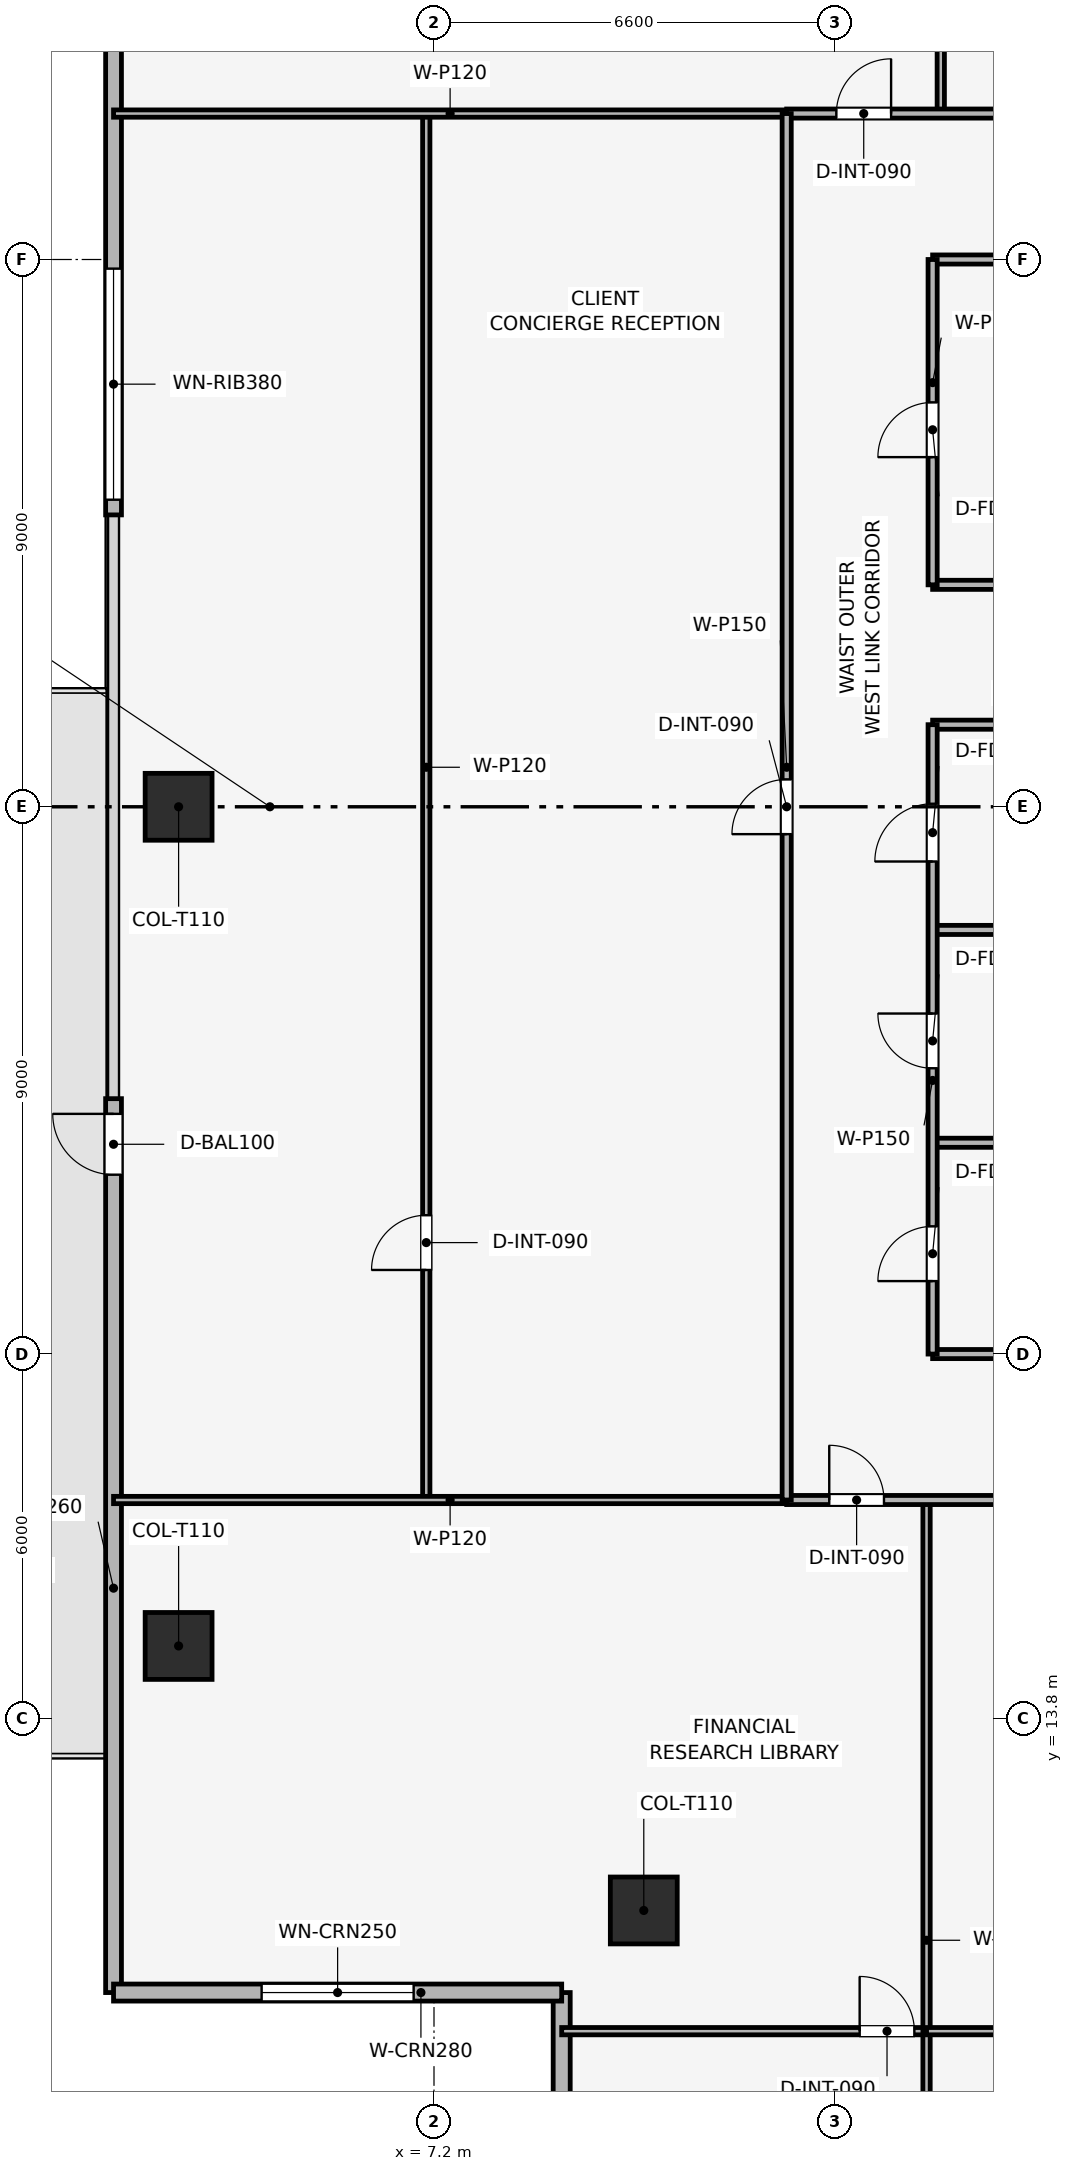
"""IFC4 building model, lengths in metres.
Left out: names, types, materials, properties, quantities, classifications, styles, units other than length and angle.
Written with IfcOpenShell. Run it as: python <this file> out.ifc"""

import sys

from ifc_helpers import new_model, si_unit, direction, frame, frame_2d, origin, origin_2d, place, context, subcontext, project, spatial, rectangle, extrude, element, fill, save


model = new_model("IFC4")
c1 = context("Model", 3, precision=1e-05, world=origin(), true_north=direction((0.0, 1.0)))
c2 = subcontext(c1, "Body", "Model", "MODEL_VIEW")
j1 = project(units=[si_unit("LENGTHUNIT", "METRE"), si_unit("PLANEANGLEUNIT", "RADIAN")], contexts=[c1])
p1 = place(None, origin())
s1 = spatial("IfcSite", under=j1, at=p1, CompositionType="ELEMENT")
p2 = place(p1, origin())
s2 = spatial("IfcBuilding", under=s1, at=p2, CompositionType="ELEMENT")
p3 = place(p2, frame((0.0, 0.0, 211.2)))
s3 = spatial("IfcBuildingStorey", under=s2, at=p3, CompositionType="ELEMENT", Elevation=211.2)
for number, where, z_axis, x_axis in (
    (1, (3.0, 28.8, 0.003), (0.0, 0.0, 1.0), (1.0, 0.0, 0.0)),
    (2, (3.0, 15.0, 0.003), (0.0, 0.0, 1.0), (1.0, 0.0, 0.0)),
    (3, (10.65, 10.65, 0.003), (0.0, 0.0, 1.0), (1.0, 0.0, 0.0)),
):
    element("IfcColumn", number, at=place(p3, frame(where, z_axis=z_axis, x_axis=x_axis)), inside=s3, PredefinedType="COLUMN", context=c2, shape_type="SweptSolid", body=[
        extrude(rectangle(XDim=1.1, YDim=1.1, at=origin_2d()), origin(), (0.0, 0.0, 1.0), 3.494),
    ])
p4 = place(p3, frame((1.93, 9.3, 0.0), z_axis=(0.0, 0.0, 1.0), x_axis=(0.0, 1.0, 0.0)))
e4 = element("IfcWall", 4, at=p4, inside=s3, PredefinedType="SOLIDWALL", context=c2, shape_type="SweptSolid", body=[
    extrude(rectangle(XDim=14.7, YDim=0.26, at=frame_2d((7.35, 0.0))), origin(), (0.0, 0.0, 1.0), 3.5),
])
p5 = place(p4, frame((13.45, 0.0, 0.0)))
e5 = element("IfcOpeningElement", 5, at=p5, cuts=e4, PredefinedType="OPENING", context=c2, shape_type="SweptSolid", body=[
    extrude(rectangle(XDim=1.0, YDim=2.2, at=frame_2d((0.5, 1.1))), frame((0.0, 0.14, 0.0), z_axis=(0.0, -1.0, 0.0), x_axis=(1.0, 0.0, 0.0)), (0.0, 0.0, 1.0), 0.28),
])
p6 = place(p3, frame((1.93, 33.6, 0.0), z_axis=(0.0, 0.0, 1.0), x_axis=(0.0, 1.0, 0.0)))
e6 = element("IfcWall", 6, at=p6, inside=s3, PredefinedType="SOLIDWALL", context=c2, shape_type="SweptSolid", body=[
    extrude(rectangle(XDim=14.7, YDim=0.26, at=frame_2d((7.35, 0.0))), origin(), (0.0, 0.0, 1.0), 3.5),
])
p7 = place(p6, frame((0.25, 0.0, 0.9)))
e7 = element("IfcOpeningElement", 7, at=p7, cuts=e6, PredefinedType="OPENING", context=c2, shape_type="SweptSolid", body=[
    extrude(rectangle(XDim=3.8, YDim=1.9, at=frame_2d((1.9, 0.95))), frame((0.0, 0.14, 0.0), z_axis=(0.0, -1.0, 0.0), x_axis=(1.0, 0.0, 0.0)), (0.0, 0.0, 1.0), 0.28),
])
p8 = place(p3, frame((9.3, 1.93, 0.0), z_axis=(0.0, 0.0, 1.0), x_axis=(0.0, 1.0, 0.0)))
e8 = element("IfcWall", 8, at=p8, inside=s3, PredefinedType="SOLIDWALL", context=c2, shape_type="SweptSolid", body=[
    extrude(rectangle(XDim=7.37, YDim=0.28, at=frame_2d((3.685, 0.0))), origin(), (0.0, 0.0, 1.0), 3.5),
])
p9 = place(p8, frame((2.435, 0.0, 0.9)))
e9 = element("IfcOpeningElement", 9, at=p9, cuts=e8, PredefinedType="OPENING", context=c2, shape_type="SweptSolid", body=[
    extrude(rectangle(XDim=2.5, YDim=1.9, at=frame_2d((1.25, 0.95))), frame((0.0, 0.15, 0.0), z_axis=(0.0, -1.0, 0.0), x_axis=(1.0, 0.0, 0.0)), (0.0, 0.0, 1.0), 0.3),
])
p10 = place(p3, frame((9.3, 9.3, 0.0), z_axis=(0.0, 0.0, 1.0), x_axis=(-1.0, 0.0, 0.0)))
e10 = element("IfcWall", 10, at=p10, inside=s3, PredefinedType="SOLIDWALL", context=c2, shape_type="SweptSolid", body=[
    extrude(rectangle(XDim=7.37, YDim=0.28, at=frame_2d((3.685, 0.0))), origin(), (0.0, 0.0, 1.0), 3.5),
])
p11 = place(p10, frame((2.435, 0.0, 0.9)))
e11 = element("IfcOpeningElement", 11, at=p11, cuts=e10, PredefinedType="OPENING", context=c2, shape_type="SweptSolid", body=[
    extrude(rectangle(XDim=2.5, YDim=1.9, at=frame_2d((1.25, 0.95))), frame((0.0, 0.15, 0.0), z_axis=(0.0, -1.0, 0.0), x_axis=(1.0, 0.0, 0.0)), (0.0, 0.0, 1.0), 0.3),
])
p12 = place(p3, frame((15.4, 19.8, 0.0), z_axis=(0.0, 0.0, 1.0), x_axis=(1.0, 0.0, 0.0)))
e12 = element("IfcWall", 12, at=p12, inside=s3, PredefinedType="PARTITIONING", context=c2, shape_type="SweptSolid", body=[
    extrude(rectangle(XDim=4.4, YDim=0.15, at=frame_2d((2.2, 0.0))), origin(), (0.0, 0.0, 1.0), 3.035),
])
for number, where, z_axis, x_axis in (
    (13, (15.4, 23.275, 0.0), (0.0, 0.0, 1.0), (1.0, 0.0, 0.0)),
    (14, (15.4, 26.775, 0.0), (0.0, 0.0, 1.0), (1.0, 0.0, 0.0)),
    (15, (15.4, 30.15, 0.0), (0.0, 0.0, 1.0), (1.0, 0.0, 0.0)),
    (16, (15.4, 32.45, 0.0), (0.0, 0.0, 1.0), (1.0, 0.0, 0.0)),
):
    element("IfcWall", number, at=place(p3, frame(where, z_axis=z_axis, x_axis=x_axis)), inside=s3, PredefinedType="PARTITIONING", context=c2, shape_type="SweptSolid", body=[
        extrude(rectangle(XDim=4.4, YDim=0.15, at=frame_2d((2.2, 0.0))), origin(), (0.0, 0.0, 1.0), 3.5),
    ])
p13 = place(p3, frame((15.4, 37.8, 0.0), z_axis=(0.0, 0.0, 1.0), x_axis=(1.0, 0.0, 0.0)))
e17 = element("IfcWall", 17, at=p13, inside=s3, PredefinedType="PARTITIONING", context=c2, shape_type="SweptSolid", body=[
    extrude(rectangle(XDim=4.4, YDim=0.15, at=frame_2d((2.2, 0.0))), origin(), (0.0, 0.0, 1.0), 3.035),
])
p14 = place(p3, frame((15.4, 19.8, 0.0), z_axis=(0.0, 0.0, 1.0), x_axis=(0.0, 1.0, 0.0)))
e18 = element("IfcWall", 18, at=p14, inside=s3, PredefinedType="PARTITIONING", context=c2, shape_type="SweptSolid", body=[
    extrude(rectangle(XDim=10.35, YDim=0.15, at=frame_2d((5.175, 0.0))), origin(), (0.0, 0.0, 1.0), 3.035),
])
p15 = place(p14, frame((1.2, 0.0, 0.0)))
e19 = element("IfcOpeningElement", 19, at=p15, cuts=e18, PredefinedType="OPENING", context=c2, shape_type="SweptSolid", body=[
    extrude(rectangle(XDim=0.9, YDim=2.1, at=frame_2d((0.45, 1.05))), frame((0.0, 0.085, 0.0), z_axis=(0.0, -1.0, 0.0), x_axis=(1.0, 0.0, 0.0)), (0.0, 0.0, 1.0), 0.17),
])
p16 = place(p14, frame((4.7, 0.0, 0.0)))
e20 = element("IfcOpeningElement", 20, at=p16, cuts=e18, PredefinedType="OPENING", context=c2, shape_type="SweptSolid", body=[
    extrude(rectangle(XDim=0.9, YDim=2.1, at=frame_2d((0.45, 1.05))), frame((0.0, 0.085, 0.0), z_axis=(0.0, -1.0, 0.0), x_axis=(1.0, 0.0, 0.0)), (0.0, 0.0, 1.0), 0.17),
])
p17 = place(p14, frame((8.1, 0.0, 0.0)))
e21 = element("IfcOpeningElement", 21, at=p17, cuts=e18, PredefinedType="OPENING", context=c2, shape_type="SweptSolid", body=[
    extrude(rectangle(XDim=0.95, YDim=2.1, at=frame_2d((0.475, 1.05))), frame((0.0, 0.085, 0.0), z_axis=(0.0, -1.0, 0.0), x_axis=(1.0, 0.0, 0.0)), (0.0, 0.0, 1.0), 0.17),
])
p18 = place(p3, frame((15.4, 32.45, 0.0), z_axis=(0.0, 0.0, 1.0), x_axis=(0.0, 1.0, 0.0)))
e22 = element("IfcWall", 22, at=p18, inside=s3, PredefinedType="PARTITIONING", context=c2, shape_type="SweptSolid", body=[
    extrude(rectangle(XDim=5.35, YDim=0.15, at=frame_2d((2.675, 0.0))), origin(), (0.0, 0.0, 1.0), 3.035),
])
p19 = place(p18, frame((2.1, 0.0, 0.0)))
e23 = element("IfcOpeningElement", 23, at=p19, cuts=e22, PredefinedType="OPENING", context=c2, shape_type="SweptSolid", body=[
    extrude(rectangle(XDim=0.9, YDim=2.1, at=frame_2d((0.45, 1.05))), frame((0.0, 0.085, 0.0), z_axis=(0.0, -1.0, 0.0), x_axis=(1.0, 0.0, 0.0)), (0.0, 0.0, 1.0), 0.17),
])
p20 = place(p3, frame((9.3, 8.665, 0.0), z_axis=(0.0, 0.0, 1.0), x_axis=(1.0, 0.0, 0.0)))
e24 = element("IfcWall", 24, at=p20, inside=s3, PredefinedType="PARTITIONING", context=c2, shape_type="SweptSolid", body=[
    extrude(rectangle(XDim=6.0, YDim=0.12, at=frame_2d((3.0, 0.0))), origin(), (0.0, 0.0, 1.0), 2.885),
])
p21 = place(p20, frame((4.9, 0.0, 0.0)))
e25 = element("IfcOpeningElement", 25, at=p21, cuts=e24, PredefinedType="OPENING", context=c2, shape_type="SweptSolid", body=[
    extrude(rectangle(XDim=0.9, YDim=2.1, at=frame_2d((0.45, 1.05))), frame((0.0, 0.07, 0.0), z_axis=(0.0, -1.0, 0.0), x_axis=(1.0, 0.0, 0.0)), (0.0, 0.0, 1.0), 0.14),
])
p22 = place(p3, frame((15.3, 1.93, 0.0), z_axis=(0.0, 0.0, 1.0), x_axis=(0.0, 1.0, 0.0)))
e26 = element("IfcWall", 26, at=p22, inside=s3, PredefinedType="PARTITIONING", context=c2, shape_type="SweptSolid", body=[
    extrude(rectangle(XDim=15.47, YDim=0.12, at=frame_2d((7.735, 0.0))), origin(), (0.0, 0.0, 1.0), 2.885),
])
p23 = place(p3, frame((15.3, 8.665, 0.0), z_axis=(0.0, 0.0, 1.0), x_axis=(1.0, 0.0, 0.0)))
e27 = element("IfcWall", 27, at=p23, inside=s3, PredefinedType="PARTITIONING", context=c2, shape_type="SweptSolid", body=[
    extrude(rectangle(XDim=13.266, YDim=0.12, at=frame_2d((6.633, 0.0))), origin(), (0.0, 0.0, 1.0), 3.035),
])
p24 = place(p23, frame((6.183, 0.0, 0.0)))
e28 = element("IfcOpeningElement", 28, at=p24, cuts=e27, PredefinedType="OPENING", context=c2, shape_type="SweptSolid", body=[
    extrude(rectangle(XDim=0.9, YDim=2.1, at=frame_2d((0.45, 1.05))), frame((0.0, 0.07, 0.0), z_axis=(0.0, -1.0, 0.0), x_axis=(1.0, 0.0, 0.0)), (0.0, 0.0, 1.0), 0.14),
])
p25 = place(p3, frame((15.534, 40.2, 0.0), z_axis=(0.0, 0.0, 1.0), x_axis=(0.0, 1.0, 0.0)))
e29 = element("IfcWall", 29, at=p25, inside=s3, PredefinedType="PARTITIONING", context=c2, shape_type="SweptSolid", body=[
    extrude(rectangle(XDim=15.47, YDim=0.12, at=frame_2d((7.735, 0.0))), origin(), (0.0, 0.0, 1.0), 2.885),
])
p26 = place(p3, frame((7.073, 17.4, 0.0), z_axis=(0.0, 0.0, 1.0), x_axis=(0.0, 1.0, 0.0)))
e30 = element("IfcWall", 30, at=p26, inside=s3, PredefinedType="PARTITIONING", context=c2, shape_type="SweptSolid", body=[
    extrude(rectangle(XDim=22.8, YDim=0.12, at=frame_2d((11.4, 0.0))), origin(), (0.0, 0.0, 1.0), 3.035),
])
p27 = place(p26, frame((3.783, 0.0, 0.0)))
e31 = element("IfcOpeningElement", 31, at=p27, cuts=e30, PredefinedType="OPENING", context=c2, shape_type="SweptSolid", body=[
    extrude(rectangle(XDim=0.9, YDim=2.1, at=frame_2d((0.45, 1.05))), frame((0.0, 0.07, 0.0), z_axis=(0.0, -1.0, 0.0), x_axis=(1.0, 0.0, 0.0)), (0.0, 0.0, 1.0), 0.14),
])
for number, where, z_axis, x_axis in (
    (32, (1.93, 17.4, 0.0), (0.0, 0.0, 1.0), (1.0, 0.0, 0.0)),
    (33, (1.93, 40.2, 0.0), (0.0, 0.0, 1.0), (1.0, 0.0, 0.0)),
):
    element("IfcWall", number, at=place(p3, frame(where, z_axis=z_axis, x_axis=x_axis)), inside=s3, PredefinedType="PARTITIONING", context=c2, shape_type="SweptSolid", body=[
        extrude(rectangle(XDim=11.07, YDim=0.12, at=frame_2d((5.535, 0.0))), origin(), (0.0, 0.0, 1.0), 2.885),
    ])
p28 = place(p3, frame((13.0, 17.4, 0.0), z_axis=(0.0, 0.0, 1.0), x_axis=(1.0, 0.0, 0.0)))
e34 = element("IfcWall", 34, at=p28, inside=s3, PredefinedType="PARTITIONING", context=c2, shape_type="SweptSolid", body=[
    extrude(rectangle(XDim=31.6, YDim=0.15, at=frame_2d((15.8, 0.0))), origin(), (0.0, 0.0, 1.0), 3.035),
])
p29 = place(p28, frame((0.7, 0.0, 0.0)))
e35 = element("IfcOpeningElement", 35, at=p29, cuts=e34, PredefinedType="OPENING", context=c2, shape_type="SweptSolid", body=[
    extrude(rectangle(XDim=0.9, YDim=2.1, at=frame_2d((0.45, 1.05))), frame((0.0, 0.085, 0.0), z_axis=(0.0, -1.0, 0.0), x_axis=(1.0, 0.0, 0.0)), (0.0, 0.0, 1.0), 0.17),
])
p30 = place(p28, frame((8.483, 0.0, 0.0)))
e36 = element("IfcOpeningElement", 36, at=p30, cuts=e34, PredefinedType="OPENING", context=c2, shape_type="SweptSolid", body=[
    extrude(rectangle(XDim=0.9, YDim=2.1, at=frame_2d((0.45, 1.05))), frame((0.0, 0.085, 0.0), z_axis=(0.0, -1.0, 0.0), x_axis=(1.0, 0.0, 0.0)), (0.0, 0.0, 1.0), 0.17),
])
p31 = place(p28, frame((23.133, 0.0, 0.0)))
e37 = element("IfcOpeningElement", 37, at=p31, cuts=e34, PredefinedType="OPENING", context=c2, shape_type="SweptSolid", body=[
    extrude(rectangle(XDim=0.9, YDim=2.1, at=frame_2d((0.45, 1.05))), frame((0.0, 0.085, 0.0), z_axis=(0.0, -1.0, 0.0), x_axis=(1.0, 0.0, 0.0)), (0.0, 0.0, 1.0), 0.17),
])
p32 = place(p3, frame((13.0, 40.2, 0.0), z_axis=(0.0, 0.0, 1.0), x_axis=(1.0, 0.0, 0.0)))
e38 = element("IfcWall", 38, at=p32, inside=s3, PredefinedType="PARTITIONING", context=c2, shape_type="SweptSolid", body=[
    extrude(rectangle(XDim=31.6, YDim=0.15, at=frame_2d((15.8, 0.0))), origin(), (0.0, 0.0, 1.0), 3.035),
])
p33 = place(p32, frame((0.817, 0.0, 0.0)))
e39 = element("IfcOpeningElement", 39, at=p33, cuts=e38, PredefinedType="OPENING", context=c2, shape_type="SweptSolid", body=[
    extrude(rectangle(XDim=0.9, YDim=2.1, at=frame_2d((0.45, 1.05))), frame((0.0, 0.085, 0.0), z_axis=(0.0, -1.0, 0.0), x_axis=(1.0, 0.0, 0.0)), (0.0, 0.0, 1.0), 0.17),
])
p34 = place(p32, frame((8.75, 0.0, 0.0)))
e40 = element("IfcOpeningElement", 40, at=p34, cuts=e38, PredefinedType="OPENING", context=c2, shape_type="SweptSolid", body=[
    extrude(rectangle(XDim=0.9, YDim=2.1, at=frame_2d((0.45, 1.05))), frame((0.0, 0.085, 0.0), z_axis=(0.0, -1.0, 0.0), x_axis=(1.0, 0.0, 0.0)), (0.0, 0.0, 1.0), 0.17),
])
p35 = place(p32, frame((23.282, 0.0, 0.0)))
e41 = element("IfcOpeningElement", 41, at=p35, cuts=e38, PredefinedType="OPENING", context=c2, shape_type="SweptSolid", body=[
    extrude(rectangle(XDim=0.9, YDim=2.1, at=frame_2d((0.45, 1.05))), frame((0.0, 0.085, 0.0), z_axis=(0.0, -1.0, 0.0), x_axis=(1.0, 0.0, 0.0)), (0.0, 0.0, 1.0), 0.17),
])
p36 = place(p3, frame((13.0, 17.4, 0.0), z_axis=(0.0, 0.0, 1.0), x_axis=(0.0, 1.0, 0.0)))
e42 = element("IfcWall", 42, at=p36, inside=s3, PredefinedType="PARTITIONING", context=c2, shape_type="SweptSolid", body=[
    extrude(rectangle(XDim=22.8, YDim=0.15, at=frame_2d((11.4, 0.0))), origin(), (0.0, 0.0, 1.0), 3.035),
])
p37 = place(p36, frame((10.95, 0.0, 0.0)))
e43 = element("IfcOpeningElement", 43, at=p37, cuts=e42, PredefinedType="OPENING", context=c2, shape_type="SweptSolid", body=[
    extrude(rectangle(XDim=0.9, YDim=2.1, at=frame_2d((0.45, 1.05))), frame((0.0, 0.085, 0.0), z_axis=(0.0, -1.0, 0.0), x_axis=(1.0, 0.0, 0.0)), (0.0, 0.0, 1.0), 0.17),
])
p38 = place(p5, origin())
e44 = element("IfcDoor", 44, at=p38, inside=s3, OperationType="SINGLE_SWING_RIGHT", PredefinedType="DOOR", context=c2, shape_type="SweptSolid", body=[
    extrude(rectangle(XDim=1.0, YDim=2.2, at=frame_2d((0.5, 1.1))), frame((0.0, 0.025, 0.0), z_axis=(0.0, -1.0, 0.0), x_axis=(1.0, 0.0, 0.0)), (0.0, 0.0, 1.0), 0.05),
])
fill(e5, e44)
p39 = place(p7, origin())
e45 = element("IfcWindow", 45, at=p39, inside=s3, PartitioningType="SINGLE_PANEL", PredefinedType="WINDOW", context=c2, shape_type="SweptSolid", body=[
    extrude(rectangle(XDim=3.8, YDim=1.9, at=frame_2d((1.9, 0.95))), frame((0.0, 0.03, 0.0), z_axis=(0.0, -1.0, 0.0), x_axis=(1.0, 0.0, 0.0)), (0.0, 0.0, 1.0), 0.06),
])
fill(e7, e45)
p40 = place(p11, origin())
e46 = element("IfcWindow", 46, at=p40, inside=s3, PartitioningType="SINGLE_PANEL", PredefinedType="WINDOW", context=c2, shape_type="SweptSolid", body=[
    extrude(rectangle(XDim=2.5, YDim=1.9, at=frame_2d((1.25, 0.95))), frame((0.0, 0.03, 0.0), z_axis=(0.0, -1.0, 0.0), x_axis=(1.0, 0.0, 0.0)), (0.0, 0.0, 1.0), 0.06),
])
fill(e11, e46)
p41 = place(p15, origin())
e47 = element("IfcDoor", 47, at=p41, inside=s3, OperationType="SINGLE_SWING_LEFT", PredefinedType="DOOR", context=c2, shape_type="SweptSolid", body=[
    extrude(rectangle(XDim=0.9, YDim=2.1, at=frame_2d((0.45, 1.05))), frame((0.0, 0.025, 0.0), z_axis=(0.0, -1.0, 0.0), x_axis=(1.0, 0.0, 0.0)), (0.0, 0.0, 1.0), 0.05),
])
fill(e19, e47)
p42 = place(p16, origin())
e48 = element("IfcDoor", 48, at=p42, inside=s3, OperationType="SINGLE_SWING_RIGHT", PredefinedType="DOOR", context=c2, shape_type="SweptSolid", body=[
    extrude(rectangle(XDim=0.9, YDim=2.1, at=frame_2d((0.45, 1.05))), frame((0.0, 0.025, 0.0), z_axis=(0.0, -1.0, 0.0), x_axis=(1.0, 0.0, 0.0)), (0.0, 0.0, 1.0), 0.05),
])
fill(e20, e48)
p43 = place(p17, origin())
e49 = element("IfcDoor", 49, at=p43, inside=s3, OperationType="SINGLE_SWING_LEFT", PredefinedType="DOOR", context=c2, shape_type="SweptSolid", body=[
    extrude(rectangle(XDim=0.95, YDim=2.1, at=frame_2d((0.475, 1.05))), frame((0.0, 0.025, 0.0), z_axis=(0.0, -1.0, 0.0), x_axis=(1.0, 0.0, 0.0)), (0.0, 0.0, 1.0), 0.05),
])
fill(e21, e49)
p44 = place(p19, origin())
e50 = element("IfcDoor", 50, at=p44, inside=s3, OperationType="SINGLE_SWING_LEFT", PredefinedType="DOOR", context=c2, shape_type="SweptSolid", body=[
    extrude(rectangle(XDim=0.9, YDim=2.1, at=frame_2d((0.45, 1.05))), frame((0.0, 0.025, 0.0), z_axis=(0.0, -1.0, 0.0), x_axis=(1.0, 0.0, 0.0)), (0.0, 0.0, 1.0), 0.05),
])
fill(e23, e50)
p45 = place(p21, origin())
e51 = element("IfcDoor", 51, at=p45, inside=s3, OperationType="SINGLE_SWING_LEFT", PredefinedType="DOOR", context=c2, shape_type="SweptSolid", body=[
    extrude(rectangle(XDim=0.9, YDim=2.1, at=frame_2d((0.45, 1.05))), frame((0.0, 0.025, 0.0), z_axis=(0.0, -1.0, 0.0), x_axis=(1.0, 0.0, 0.0)), (0.0, 0.0, 1.0), 0.05),
])
fill(e25, e51)
p46 = place(p27, origin())
e52 = element("IfcDoor", 52, at=p46, inside=s3, OperationType="SINGLE_SWING_LEFT", PredefinedType="DOOR", context=c2, shape_type="SweptSolid", body=[
    extrude(rectangle(XDim=0.9, YDim=2.1, at=frame_2d((0.45, 1.05))), frame((0.0, 0.025, 0.0), z_axis=(0.0, -1.0, 0.0), x_axis=(1.0, 0.0, 0.0)), (0.0, 0.0, 1.0), 0.05),
])
fill(e31, e52)
p47 = place(p29, origin())
e53 = element("IfcDoor", 53, at=p47, inside=s3, OperationType="SINGLE_SWING_LEFT", PredefinedType="DOOR", context=c2, shape_type="SweptSolid", body=[
    extrude(rectangle(XDim=0.9, YDim=2.1, at=frame_2d((0.45, 1.05))), frame((0.0, 0.025, 0.0), z_axis=(0.0, -1.0, 0.0), x_axis=(1.0, 0.0, 0.0)), (0.0, 0.0, 1.0), 0.05),
])
fill(e35, e53)
p48 = place(p33, origin())
e54 = element("IfcDoor", 54, at=p48, inside=s3, OperationType="SINGLE_SWING_RIGHT", PredefinedType="DOOR", context=c2, shape_type="SweptSolid", body=[
    extrude(rectangle(XDim=0.9, YDim=2.1, at=frame_2d((0.45, 1.05))), frame((0.0, 0.025, 0.0), z_axis=(0.0, -1.0, 0.0), x_axis=(1.0, 0.0, 0.0)), (0.0, 0.0, 1.0), 0.05),
])
fill(e39, e54)
p49 = place(p37, origin())
e55 = element("IfcDoor", 55, at=p49, inside=s3, OperationType="SINGLE_SWING_LEFT", PredefinedType="DOOR", context=c2, shape_type="SweptSolid", body=[
    extrude(rectangle(XDim=0.9, YDim=2.1, at=frame_2d((0.45, 1.05))), frame((0.0, 0.025, 0.0), z_axis=(0.0, -1.0, 0.0), x_axis=(1.0, 0.0, 0.0)), (0.0, 0.0, 1.0), 0.05),
])
fill(e43, e55)
save(model, sys.argv[1])
